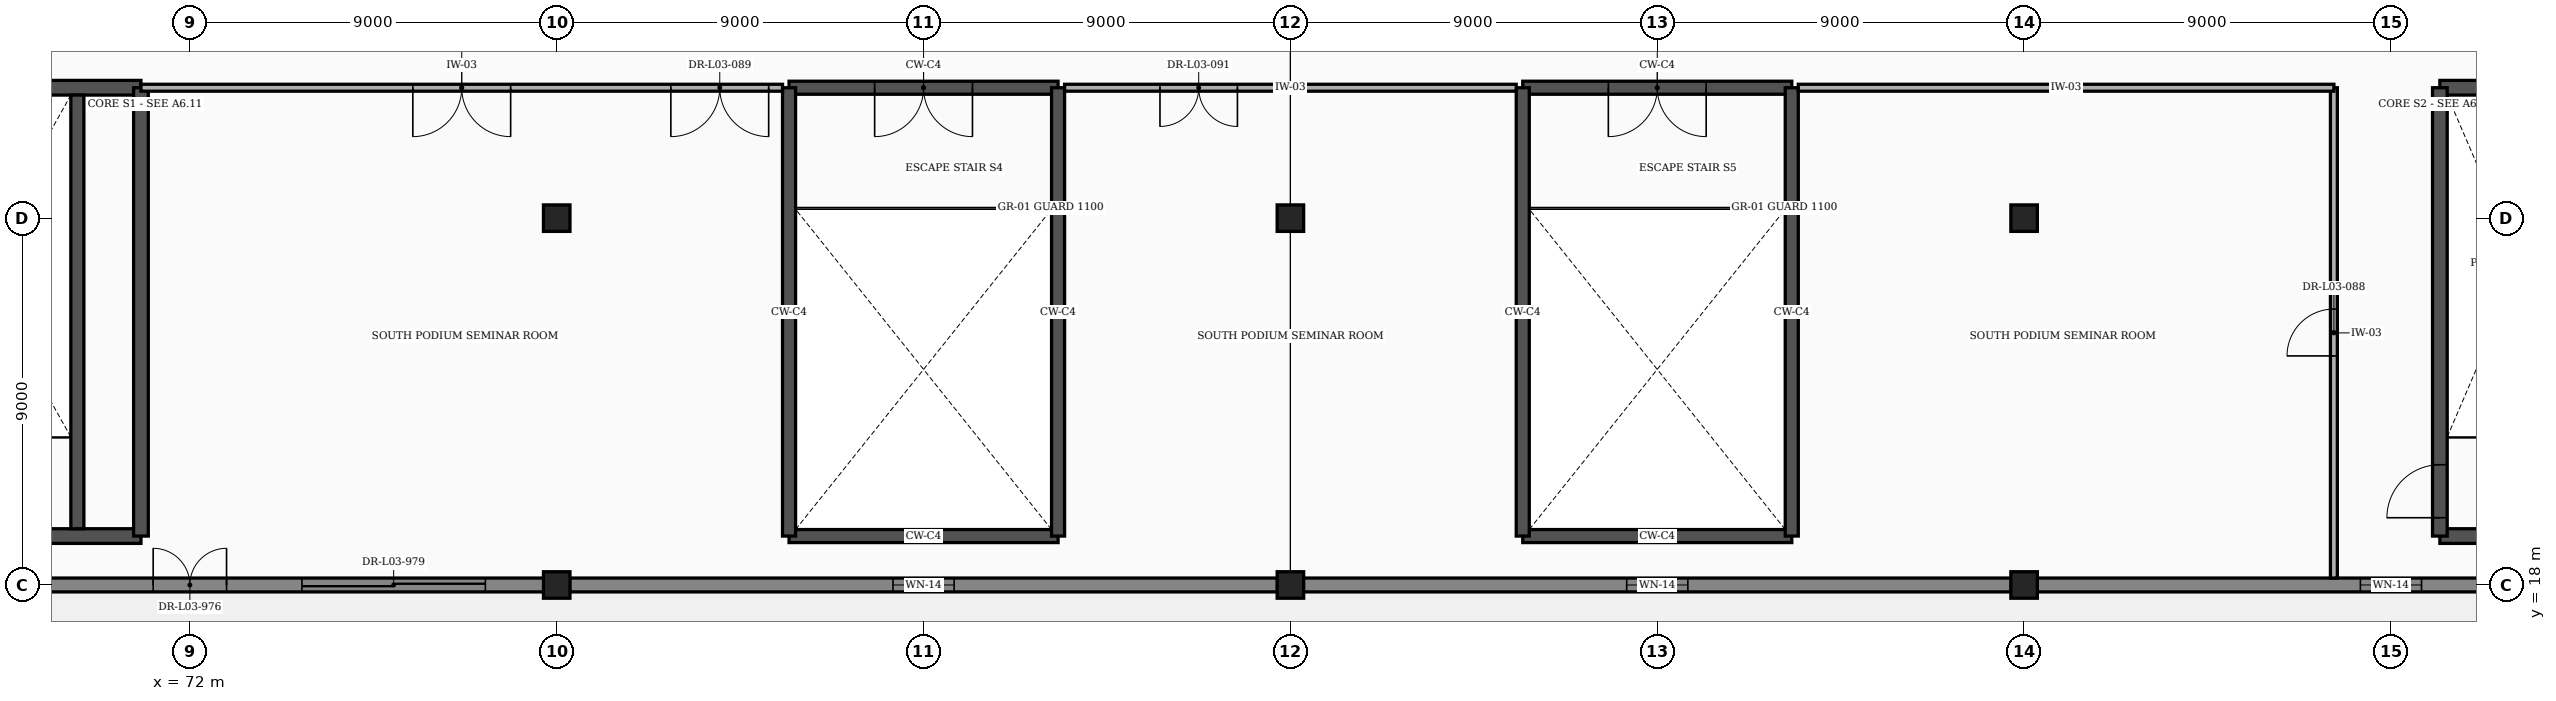
"""IFC4 building model, lengths in metres.
Left out: names, types, materials, properties, quantities, classifications, styles, units other than length and angle.
Written with IfcOpenShell. Run it as: python <this file> out.ifc"""

import sys

from ifc_helpers import new_model, si_unit, direction, frame, frame_2d, origin, origin_2d, place, context, subcontext, project, spatial, rectangle, extrude, element, fill, save


model = new_model("IFC4")
c1 = context("Model", 3, precision=1e-05, world=origin(), true_north=direction((0.0, 1.0)))
c2 = subcontext(c1, "Body", "Model", "MODEL_VIEW")
j1 = project(units=[si_unit("LENGTHUNIT", "METRE"), si_unit("PLANEANGLEUNIT", "RADIAN")], contexts=[c1])
p1 = place(None, origin())
s1 = spatial("IfcSite", under=j1, at=p1, CompositionType="ELEMENT")
p2 = place(p1, origin())
s2 = spatial("IfcBuilding", under=s1, at=p2, CompositionType="ELEMENT")
p3 = place(p2, frame((0.0, 0.0, 16.8)))
s3 = spatial("IfcBuildingStorey", under=s2, at=p3, CompositionType="ELEMENT", Elevation=16.8)
for number, where, z_axis, x_axis in (
    (1, (81.0, 18.0, 0.0), (0.0, 0.0, 1.0), (1.0, 0.0, 0.0)),
    (2, (81.0, 27.0, 0.0), (0.0, 0.0, 1.0), (1.0, 0.0, 0.0)),
    (3, (99.0, 18.0, 0.0), (0.0, 0.0, 1.0), (1.0, 0.0, 0.0)),
    (4, (99.0, 27.0, 0.0), (0.0, 0.0, 1.0), (1.0, 0.0, 0.0)),
    (5, (117.0, 18.0, 0.0), (0.0, 0.0, 1.0), (1.0, 0.0, 0.0)),
    (6, (117.0, 27.0, 0.0), (0.0, 0.0, 1.0), (1.0, 0.0, 0.0)),
):
    element("IfcColumn", number, at=place(p3, frame(where, z_axis=z_axis, x_axis=x_axis)), inside=s3, PredefinedType="COLUMN", context=c2, shape_type="SweptSolid", body=[
        extrude(rectangle(XDim=0.65, YDim=0.65, at=origin_2d()), origin(), (0.0, 0.0, 1.0), 4.8),
    ])
p4 = place(p3, frame((63.317, 18.0, 0.0), z_axis=(0.0, 0.0, 1.0), x_axis=(1.0, 0.0, 0.0)))
e7 = element("IfcWall", 7, at=p4, inside=s3, PredefinedType="STANDARD", context=c2, shape_type="SweptSolid", body=[
    extrude(rectangle(XDim=17.366, YDim=0.34, at=frame_2d((8.683, 0.0))), origin(), (0.0, 0.0, 1.0), 4.195),
])
p5 = place(p4, frame((7.783, 0.0, 0.0)))
e8 = element("IfcOpeningElement", 8, at=p5, cuts=e7, PredefinedType="OPENING", context=c2, shape_type="SweptSolid", body=[
    extrude(rectangle(XDim=1.8, YDim=2.3, at=frame_2d((0.9, 1.15))), frame((0.0, 0.182, 0.0), z_axis=(0.0, -1.0, 0.0), x_axis=(1.0, 0.0, 0.0)), (0.0, 0.0, 1.0), 0.364),
])
p6 = place(p4, frame((11.433, 0.0, 0.0)))
e9 = element("IfcOpeningElement", 9, at=p6, cuts=e7, PredefinedType="OPENING", context=c2, shape_type="SweptSolid", body=[
    extrude(rectangle(XDim=4.5, YDim=2.5, at=frame_2d((2.25, 1.25))), frame((0.0, 0.182, 0.0), z_axis=(0.0, -1.0, 0.0), x_axis=(1.0, 0.0, 0.0)), (0.0, 0.0, 1.0), 0.364),
])
p7 = place(p3, frame((81.317, 18.0, 0.0), z_axis=(0.0, 0.0, 1.0), x_axis=(1.0, 0.0, 0.0)))
e10 = element("IfcWall", 10, at=p7, inside=s3, PredefinedType="STANDARD", context=c2, shape_type="SweptSolid", body=[
    extrude(rectangle(XDim=17.366, YDim=0.34, at=frame_2d((8.683, 0.0))), origin(), (0.0, 0.0, 1.0), 4.195),
])
p8 = place(p7, frame((7.933, 0.0, 0.85)))
e11 = element("IfcOpeningElement", 11, at=p8, cuts=e10, PredefinedType="OPENING", context=c2, shape_type="SweptSolid", body=[
    extrude(rectangle(XDim=1.5, YDim=1.8, at=frame_2d((0.75, 0.9))), frame((0.0, 0.182, 0.0), z_axis=(0.0, -1.0, 0.0), x_axis=(1.0, 0.0, 0.0)), (0.0, 0.0, 1.0), 0.364),
])
p9 = place(p3, frame((99.317, 18.0, 0.0), z_axis=(0.0, 0.0, 1.0), x_axis=(1.0, 0.0, 0.0)))
e12 = element("IfcWall", 12, at=p9, inside=s3, PredefinedType="STANDARD", context=c2, shape_type="SweptSolid", body=[
    extrude(rectangle(XDim=17.366, YDim=0.34, at=frame_2d((8.683, 0.0))), origin(), (0.0, 0.0, 1.0), 4.195),
])
p10 = place(p9, frame((7.933, 0.0, 0.85)))
e13 = element("IfcOpeningElement", 13, at=p10, cuts=e12, PredefinedType="OPENING", context=c2, shape_type="SweptSolid", body=[
    extrude(rectangle(XDim=1.5, YDim=1.8, at=frame_2d((0.75, 0.9))), frame((0.0, 0.182, 0.0), z_axis=(0.0, -1.0, 0.0), x_axis=(1.0, 0.0, 0.0)), (0.0, 0.0, 1.0), 0.364),
])
p11 = place(p3, frame((117.317, 18.0, 0.0), z_axis=(0.0, 0.0, 1.0), x_axis=(1.0, 0.0, 0.0)))
e14 = element("IfcWall", 14, at=p11, inside=s3, PredefinedType="STANDARD", context=c2, shape_type="SweptSolid", body=[
    extrude(rectangle(XDim=17.366, YDim=0.34, at=frame_2d((8.683, 0.0))), origin(), (0.0, 0.0, 1.0), 4.195),
])
p12 = place(p11, frame((7.933, 0.0, 0.85)))
e15 = element("IfcOpeningElement", 15, at=p12, cuts=e14, PredefinedType="OPENING", context=c2, shape_type="SweptSolid", body=[
    extrude(rectangle(XDim=1.5, YDim=1.8, at=frame_2d((0.75, 0.9))), frame((0.0, 0.182, 0.0), z_axis=(0.0, -1.0, 0.0), x_axis=(1.0, 0.0, 0.0)), (0.0, 0.0, 1.0), 0.364),
])
for number, where, z_axis, x_axis in (
    (16, (64.2, 19.2, 0.0), (0.0, 0.0, 1.0), (1.0, 0.0, 0.0)),
    (17, (64.2, 30.2, 0.0), (0.0, 0.0, 1.0), (1.0, 0.0, 0.0)),
):
    element("IfcWall", number, at=place(p3, frame(where, z_axis=z_axis, x_axis=x_axis)), inside=s3, PredefinedType="SHEAR", context=c2, shape_type="SweptSolid", body=[
        extrude(rectangle(XDim=6.6, YDim=0.36, at=frame_2d((3.3, 0.0))), origin(), (0.0, 0.0, 1.0), 4.555),
    ])
p13 = place(p3, frame((70.8, 19.2, 0.0), z_axis=(0.0, 0.0, 1.0), x_axis=(0.0, 1.0, 0.0)))
e18 = element("IfcWall", 18, at=p13, inside=s3, PredefinedType="SHEAR", context=c2, shape_type="SweptSolid", body=[
    extrude(rectangle(XDim=11.0, YDim=0.36, at=frame_2d((5.5, 0.0))), origin(), (0.0, 0.0, 1.0), 4.555),
])
p14 = place(p3, frame((69.24, 19.38, 0.0), z_axis=(0.0, 0.0, 1.0), x_axis=(0.0, 1.0, 0.0)))
e19 = element("IfcWall", 19, at=p14, inside=s3, PredefinedType="SHEAR", context=c2, shape_type="SweptSolid", body=[
    extrude(rectangle(XDim=10.64, YDim=0.32, at=frame_2d((5.32, 0.0))), origin(), (0.0, 0.0, 1.0), 4.555),
])
p15 = place(p3, frame((127.2, 19.2, 0.0), z_axis=(0.0, 0.0, 1.0), x_axis=(1.0, 0.0, 0.0)))
e20 = element("IfcWall", 20, at=p15, inside=s3, PredefinedType="SHEAR", context=c2, shape_type="SweptSolid", body=[
    extrude(rectangle(XDim=6.6, YDim=0.36, at=frame_2d((3.3, 0.0))), origin(), (0.0, 0.0, 1.0), 4.555),
])
p16 = place(p3, frame((127.2, 30.2, 0.0), z_axis=(0.0, 0.0, 1.0), x_axis=(1.0, 0.0, 0.0)))
e21 = element("IfcWall", 21, at=p16, inside=s3, PredefinedType="SHEAR", context=c2, shape_type="SweptSolid", body=[
    extrude(rectangle(XDim=6.6, YDim=0.36, at=frame_2d((3.3, 0.0))), origin(), (0.0, 0.0, 1.0), 4.555),
])
p17 = place(p16, frame((4.45, 0.0, 0.0)))
e22 = element("IfcOpeningElement", 22, at=p17, cuts=e21, PredefinedType="OPENING", context=c2, shape_type="SweptSolid", body=[
    extrude(rectangle(XDim=1.6, YDim=2.3, at=frame_2d((0.8, 1.15))), frame((0.0, 0.192, 0.0), z_axis=(0.0, -1.0, 0.0), x_axis=(1.0, 0.0, 0.0)), (0.0, 0.0, 1.0), 0.384),
])
p18 = place(p3, frame((127.2, 19.2, 0.0), z_axis=(0.0, 0.0, 1.0), x_axis=(0.0, 1.0, 0.0)))
e23 = element("IfcWall", 23, at=p18, inside=s3, PredefinedType="SHEAR", context=c2, shape_type="SweptSolid", body=[
    extrude(rectangle(XDim=11.0, YDim=0.36, at=frame_2d((5.5, 0.0))), origin(), (0.0, 0.0, 1.0), 4.555),
])
p19 = place(p18, frame((0.45, 0.0, 0.0)))
e24 = element("IfcOpeningElement", 24, at=p19, cuts=e23, PredefinedType="OPENING", context=c2, shape_type="SweptSolid", body=[
    extrude(rectangle(XDim=1.3, YDim=2.2, at=frame_2d((0.65, 1.1))), frame((0.0, 0.192, 0.0), z_axis=(0.0, -1.0, 0.0), x_axis=(1.0, 0.0, 0.0)), (0.0, 0.0, 1.0), 0.384),
])
p20 = place(p3, frame((86.7, 19.2, 0.0), z_axis=(0.0, 0.0, 1.0), x_axis=(1.0, 0.0, 0.0)))
e25 = element("IfcWall", 25, at=p20, inside=s3, PredefinedType="SHEAR", context=c2, shape_type="SweptSolid", body=[
    extrude(rectangle(XDim=6.6, YDim=0.32, at=frame_2d((3.3, 0.0))), origin(), (0.0, 0.0, 1.0), 4.555),
])
p21 = place(p3, frame((86.7, 30.2, 0.0), z_axis=(0.0, 0.0, 1.0), x_axis=(1.0, 0.0, 0.0)))
e26 = element("IfcWall", 26, at=p21, inside=s3, PredefinedType="SHEAR", context=c2, shape_type="SweptSolid", body=[
    extrude(rectangle(XDim=6.6, YDim=0.32, at=frame_2d((3.3, 0.0))), origin(), (0.0, 0.0, 1.0), 4.555),
])
p22 = place(p21, frame((2.1, 0.0, 0.0)))
e27 = element("IfcOpeningElement", 27, at=p22, cuts=e26, PredefinedType="OPENING", context=c2, shape_type="SweptSolid", body=[
    extrude(rectangle(XDim=2.4, YDim=2.25, at=frame_2d((1.2, 1.125))), frame((0.0, 0.172, 0.0), z_axis=(0.0, -1.0, 0.0), x_axis=(1.0, 0.0, 0.0)), (0.0, 0.0, 1.0), 0.344),
])
for number, where, z_axis, x_axis in (
    (28, (86.7, 19.2, 0.0), (0.0, 0.0, 1.0), (0.0, 1.0, 0.0)),
    (29, (93.3, 19.2, 0.0), (0.0, 0.0, 1.0), (0.0, 1.0, 0.0)),
):
    element("IfcWall", number, at=place(p3, frame(where, z_axis=z_axis, x_axis=x_axis)), inside=s3, PredefinedType="SHEAR", context=c2, shape_type="SweptSolid", body=[
        extrude(rectangle(XDim=11.0, YDim=0.32, at=frame_2d((5.5, 0.0))), origin(), (0.0, 0.0, 1.0), 4.555),
    ])
p23 = place(p3, frame((104.7, 19.2, 0.0), z_axis=(0.0, 0.0, 1.0), x_axis=(1.0, 0.0, 0.0)))
e30 = element("IfcWall", 30, at=p23, inside=s3, PredefinedType="SHEAR", context=c2, shape_type="SweptSolid", body=[
    extrude(rectangle(XDim=6.6, YDim=0.32, at=frame_2d((3.3, 0.0))), origin(), (0.0, 0.0, 1.0), 4.555),
])
p24 = place(p3, frame((104.7, 30.2, 0.0), z_axis=(0.0, 0.0, 1.0), x_axis=(1.0, 0.0, 0.0)))
e31 = element("IfcWall", 31, at=p24, inside=s3, PredefinedType="SHEAR", context=c2, shape_type="SweptSolid", body=[
    extrude(rectangle(XDim=6.6, YDim=0.32, at=frame_2d((3.3, 0.0))), origin(), (0.0, 0.0, 1.0), 4.555),
])
p25 = place(p24, frame((2.1, 0.0, 0.0)))
e32 = element("IfcOpeningElement", 32, at=p25, cuts=e31, PredefinedType="OPENING", context=c2, shape_type="SweptSolid", body=[
    extrude(rectangle(XDim=2.4, YDim=2.25, at=frame_2d((1.2, 1.125))), frame((0.0, 0.172, 0.0), z_axis=(0.0, -1.0, 0.0), x_axis=(1.0, 0.0, 0.0)), (0.0, 0.0, 1.0), 0.344),
])
for number, where, z_axis, x_axis in (
    (33, (104.7, 19.2, 0.0), (0.0, 0.0, 1.0), (0.0, 1.0, 0.0)),
    (34, (111.3, 19.2, 0.0), (0.0, 0.0, 1.0), (0.0, 1.0, 0.0)),
):
    element("IfcWall", number, at=place(p3, frame(where, z_axis=z_axis, x_axis=x_axis)), inside=s3, PredefinedType="SHEAR", context=c2, shape_type="SweptSolid", body=[
        extrude(rectangle(XDim=11.0, YDim=0.32, at=frame_2d((5.5, 0.0))), origin(), (0.0, 0.0, 1.0), 4.555),
    ])
p26 = place(p3, frame((124.6, 18.17, 0.0), z_axis=(0.0, 0.0, 1.0), x_axis=(0.0, 1.0, 0.0)))
e35 = element("IfcWall", 35, at=p26, inside=s3, PredefinedType="PARTITIONING", context=c2, shape_type="SweptSolid", body=[
    extrude(rectangle(XDim=12.03, YDim=0.17, at=frame_2d((6.015, 0.0))), origin(), (0.0, 0.0, 1.0), 4.555),
])
p27 = place(p26, frame((5.45, 0.0, 0.0)))
e36 = element("IfcOpeningElement", 36, at=p27, cuts=e35, PredefinedType="OPENING", context=c2, shape_type="SweptSolid", body=[
    extrude(rectangle(XDim=1.15, YDim=2.15, at=frame_2d((0.575, 1.075))), frame((0.0, 0.097, 0.0), z_axis=(0.0, -1.0, 0.0), x_axis=(1.0, 0.0, 0.0)), (0.0, 0.0, 1.0), 0.194),
])
p28 = place(p3, frame((70.8, 30.2, 0.0), z_axis=(0.0, 0.0, 1.0), x_axis=(1.0, 0.0, 0.0)))
e37 = element("IfcWall", 37, at=p28, inside=s3, PredefinedType="PARTITIONING", context=c2, shape_type="SweptSolid", body=[
    extrude(rectangle(XDim=15.74, YDim=0.17, at=frame_2d((7.87, 0.0))), origin(), (0.0, 0.0, 1.0), 4.555),
])
p29 = place(p28, frame((13.0, 0.0, 0.0)))
e38 = element("IfcOpeningElement", 38, at=p29, cuts=e37, PredefinedType="OPENING", context=c2, shape_type="SweptSolid", body=[
    extrude(rectangle(XDim=2.4, YDim=2.35, at=frame_2d((1.2, 1.175))), frame((0.0, 0.097, 0.0), z_axis=(0.0, -1.0, 0.0), x_axis=(1.0, 0.0, 0.0)), (0.0, 0.0, 1.0), 0.194),
])
p30 = place(p28, frame((6.67, 0.0, 0.0)))
e39 = element("IfcOpeningElement", 39, at=p30, cuts=e37, PredefinedType="OPENING", context=c2, shape_type="SweptSolid", body=[
    extrude(rectangle(XDim=2.4, YDim=2.35, at=frame_2d((1.2, 1.175))), frame((0.0, 0.097, 0.0), z_axis=(0.0, -1.0, 0.0), x_axis=(1.0, 0.0, 0.0)), (0.0, 0.0, 1.0), 0.194),
])
p31 = place(p3, frame((93.46, 30.2, 0.0), z_axis=(0.0, 0.0, 1.0), x_axis=(1.0, 0.0, 0.0)))
e40 = element("IfcWall", 40, at=p31, inside=s3, PredefinedType="PARTITIONING", context=c2, shape_type="SweptSolid", body=[
    extrude(rectangle(XDim=11.08, YDim=0.17, at=frame_2d((5.54, 0.0))), origin(), (0.0, 0.0, 1.0), 4.555),
])
p32 = place(p31, frame((2.34, 0.0, 0.0)))
e41 = element("IfcOpeningElement", 41, at=p32, cuts=e40, PredefinedType="OPENING", context=c2, shape_type="SweptSolid", body=[
    extrude(rectangle(XDim=1.9, YDim=2.35, at=frame_2d((0.95, 1.175))), frame((0.0, 0.097, 0.0), z_axis=(0.0, -1.0, 0.0), x_axis=(1.0, 0.0, 0.0)), (0.0, 0.0, 1.0), 0.194),
])
p33 = place(p3, frame((111.46, 30.2, 0.0), z_axis=(0.0, 0.0, 1.0), x_axis=(1.0, 0.0, 0.0)))
e42 = element("IfcWall", 42, at=p33, inside=s3, PredefinedType="PARTITIONING", context=c2, shape_type="SweptSolid", body=[
    extrude(rectangle(XDim=13.14, YDim=0.17, at=frame_2d((6.57, 0.0))), origin(), (0.0, 0.0, 1.0), 4.555),
])
p34 = place(p5, origin())
e43 = element("IfcDoor", 43, at=p34, inside=s3, OperationType="DOUBLE_DOOR_SINGLE_SWING", PredefinedType="DOOR", context=c2, shape_type="SweptSolid", body=[
    extrude(rectangle(XDim=1.8, YDim=2.3, at=frame_2d((0.9, 1.15))), frame((0.0, 0.025, 0.0), z_axis=(0.0, -1.0, 0.0), x_axis=(1.0, 0.0, 0.0)), (0.0, 0.0, 1.0), 0.05),
])
fill(e8, e43)
p35 = place(p8, origin())
e44 = element("IfcWindow", 44, at=p35, inside=s3, PartitioningType="SINGLE_PANEL", PredefinedType="WINDOW", context=c2, shape_type="SweptSolid", body=[
    extrude(rectangle(XDim=1.5, YDim=1.8, at=frame_2d((0.75, 0.9))), frame((0.0, 0.03, 0.0), z_axis=(0.0, -1.0, 0.0), x_axis=(1.0, 0.0, 0.0)), (0.0, 0.0, 1.0), 0.06),
])
fill(e11, e44)
p36 = place(p10, origin())
e45 = element("IfcWindow", 45, at=p36, inside=s3, PartitioningType="SINGLE_PANEL", PredefinedType="WINDOW", context=c2, shape_type="SweptSolid", body=[
    extrude(rectangle(XDim=1.5, YDim=1.8, at=frame_2d((0.75, 0.9))), frame((0.0, 0.03, 0.0), z_axis=(0.0, -1.0, 0.0), x_axis=(1.0, 0.0, 0.0)), (0.0, 0.0, 1.0), 0.06),
])
fill(e13, e45)
p37 = place(p12, origin())
e46 = element("IfcWindow", 46, at=p37, inside=s3, PartitioningType="SINGLE_PANEL", PredefinedType="WINDOW", context=c2, shape_type="SweptSolid", body=[
    extrude(rectangle(XDim=1.5, YDim=1.8, at=frame_2d((0.75, 0.9))), frame((0.0, 0.03, 0.0), z_axis=(0.0, -1.0, 0.0), x_axis=(1.0, 0.0, 0.0)), (0.0, 0.0, 1.0), 0.06),
])
fill(e15, e46)
p38 = place(p6, origin())
e47 = element("IfcDoor", 47, at=p38, inside=s3, OperationType="DOUBLE_DOOR_SLIDING", PredefinedType="DOOR", context=c2, shape_type="SweptSolid", body=[
    extrude(rectangle(XDim=4.5, YDim=2.5, at=frame_2d((2.25, 1.25))), frame((0.0, 0.025, 0.0), z_axis=(0.0, -1.0, 0.0), x_axis=(1.0, 0.0, 0.0)), (0.0, 0.0, 1.0), 0.05),
])
fill(e9, e47)
p39 = place(p19, origin())
e48 = element("IfcDoor", 48, at=p39, inside=s3, OperationType="SINGLE_SWING_LEFT", PredefinedType="DOOR", context=c2, shape_type="SweptSolid", body=[
    extrude(rectangle(XDim=1.3, YDim=2.2, at=frame_2d((0.65, 1.1))), frame((0.0, 0.025, 0.0), z_axis=(0.0, -1.0, 0.0), x_axis=(1.0, 0.0, 0.0)), (0.0, 0.0, 1.0), 0.05),
])
fill(e24, e48)
p40 = place(p22, frame((2.4, 0.0, 0.0), z_axis=(0.0, 0.0, 1.0), x_axis=(-1.0, 0.0, 0.0)))
e49 = element("IfcDoor", 49, at=p40, inside=s3, OperationType="DOUBLE_DOOR_SINGLE_SWING", PredefinedType="DOOR", context=c2, shape_type="SweptSolid", body=[
    extrude(rectangle(XDim=2.4, YDim=2.25, at=frame_2d((1.2, 1.125))), frame((0.0, 0.025, 0.0), z_axis=(0.0, -1.0, 0.0), x_axis=(1.0, 0.0, 0.0)), (0.0, 0.0, 1.0), 0.05),
])
fill(e27, e49)
p41 = place(p25, frame((2.4, 0.0, 0.0), z_axis=(0.0, 0.0, 1.0), x_axis=(-1.0, 0.0, 0.0)))
e50 = element("IfcDoor", 50, at=p41, inside=s3, OperationType="DOUBLE_DOOR_SINGLE_SWING", PredefinedType="DOOR", context=c2, shape_type="SweptSolid", body=[
    extrude(rectangle(XDim=2.4, YDim=2.25, at=frame_2d((1.2, 1.125))), frame((0.0, 0.025, 0.0), z_axis=(0.0, -1.0, 0.0), x_axis=(1.0, 0.0, 0.0)), (0.0, 0.0, 1.0), 0.05),
])
fill(e32, e50)
p42 = place(p27, origin())
e51 = element("IfcDoor", 51, at=p42, inside=s3, OperationType="SINGLE_SWING_LEFT", PredefinedType="DOOR", context=c2, shape_type="SweptSolid", body=[
    extrude(rectangle(XDim=1.15, YDim=2.15, at=frame_2d((0.575, 1.075))), frame((0.0, 0.025, 0.0), z_axis=(0.0, -1.0, 0.0), x_axis=(1.0, 0.0, 0.0)), (0.0, 0.0, 1.0), 0.05),
])
fill(e36, e51)
p43 = place(p29, frame((2.4, 0.0, 0.0), z_axis=(0.0, 0.0, 1.0), x_axis=(-1.0, 0.0, 0.0)))
e52 = element("IfcDoor", 52, at=p43, inside=s3, OperationType="DOUBLE_DOOR_SINGLE_SWING", PredefinedType="DOOR", context=c2, shape_type="SweptSolid", body=[
    extrude(rectangle(XDim=2.4, YDim=2.35, at=frame_2d((1.2, 1.175))), frame((0.0, 0.025, 0.0), z_axis=(0.0, -1.0, 0.0), x_axis=(1.0, 0.0, 0.0)), (0.0, 0.0, 1.0), 0.05),
])
fill(e38, e52)
p44 = place(p30, frame((2.4, 0.0, 0.0), z_axis=(0.0, 0.0, 1.0), x_axis=(-1.0, 0.0, 0.0)))
e53 = element("IfcDoor", 53, at=p44, inside=s3, OperationType="DOUBLE_DOOR_SINGLE_SWING", PredefinedType="DOOR", context=c2, shape_type="SweptSolid", body=[
    extrude(rectangle(XDim=2.4, YDim=2.35, at=frame_2d((1.2, 1.175))), frame((0.0, 0.025, 0.0), z_axis=(0.0, -1.0, 0.0), x_axis=(1.0, 0.0, 0.0)), (0.0, 0.0, 1.0), 0.05),
])
fill(e39, e53)
p45 = place(p32, frame((1.9, 0.0, 0.0), z_axis=(0.0, 0.0, 1.0), x_axis=(-1.0, 0.0, 0.0)))
e54 = element("IfcDoor", 54, at=p45, inside=s3, OperationType="DOUBLE_DOOR_SINGLE_SWING", PredefinedType="DOOR", context=c2, shape_type="SweptSolid", body=[
    extrude(rectangle(XDim=1.9, YDim=2.35, at=frame_2d((0.95, 1.175))), frame((0.0, 0.025, 0.0), z_axis=(0.0, -1.0, 0.0), x_axis=(1.0, 0.0, 0.0)), (0.0, 0.0, 1.0), 0.05),
])
fill(e41, e54)
save(model, sys.argv[1])
